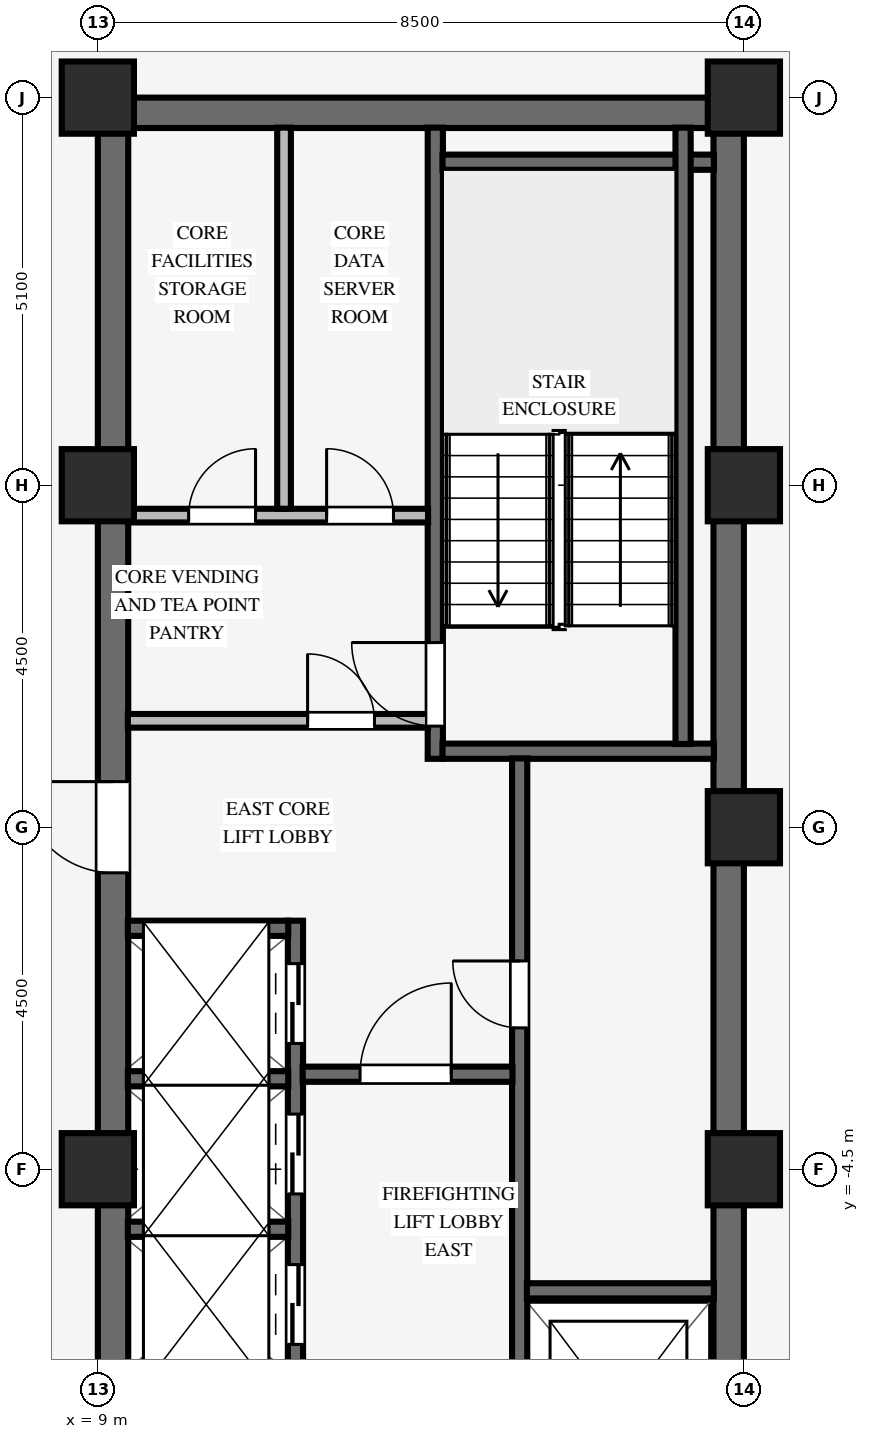
"""IFC4 building model, lengths in metres.
Left out: names, types, materials, properties, quantities, classifications, styles, units other than length and angle.
Written with IfcOpenShell. Run it as: python <this file> out.ifc"""

import sys

from ifc_helpers import new_model, si_unit, direction, frame, frame_2d, origin, origin_2d, place, context, subcontext, project, spatial, rectangle, extrude, source, transform, mapped, element, fill, save


model = new_model("IFC4")
c1 = context("Model", 3, precision=1e-05, world=origin(), true_north=direction((0.0, 1.0)))
c2 = subcontext(c1, "Body", "Model", "MODEL_VIEW")
j1 = project(units=[si_unit("LENGTHUNIT", "METRE"), si_unit("PLANEANGLEUNIT", "RADIAN")], contexts=[c1])
p1 = place(None, origin())
s1 = spatial("IfcSite", under=j1, at=p1, CompositionType="ELEMENT")
p2 = place(p1, origin())
s2 = spatial("IfcBuilding", under=s1, at=p2, CompositionType="ELEMENT")
p3 = place(p2, frame((0.0, 0.0, 153.05)))
s3 = spatial("IfcBuildingStorey", under=s2, at=p3, CompositionType="ELEMENT", Elevation=153.05)
p4 = place(p3, frame((9.0, 9.4, 0.0), z_axis=(0.0, 0.0, 1.0), x_axis=(1.0, 0.0, 0.0)))
e1 = element("IfcWall", 1, at=p4, inside=s3, PredefinedType="SHEAR", context=c2, shape_type="SweptSolid", body=[
    extrude(rectangle(XDim=8.5, YDim=0.4, at=frame_2d((4.25, 0.0))), origin(), (0.0, 0.0, 1.0), 3.37),
])
p5 = place(p3, frame((9.2, -9.205, 0.0), z_axis=(0.0, 0.0, 1.0), x_axis=(0.0, 1.0, 0.0)))
e2 = element("IfcWall", 2, at=p5, inside=s3, PredefinedType="SHEAR", context=c2, shape_type="SweptSolid", body=[
    extrude(rectangle(XDim=18.41, YDim=0.4, at=frame_2d((9.205, 0.0))), origin(), (0.0, 0.0, 1.0), 3.37),
])
p6 = place(p5, frame((8.605, 0.0, 0.0)))
e3 = element("IfcOpeningElement", 3, at=p6, cuts=e2, PredefinedType="OPENING", context=c2, shape_type="SweptSolid", body=[
    extrude(rectangle(XDim=1.2, YDim=2.15, at=frame_2d((0.6, 1.075))), frame((0.0, 0.21, 0.0), z_axis=(0.0, -1.0, 0.0), x_axis=(1.0, 0.0, 0.0)), (0.0, 0.0, 1.0), 0.42),
])
p7 = place(p3, frame((17.3, -9.205, 0.0), z_axis=(0.0, 0.0, 1.0), x_axis=(0.0, 1.0, 0.0)))
e4 = element("IfcWall", 4, at=p7, inside=s3, PredefinedType="SHEAR", context=c2, shape_type="SweptSolid", body=[
    extrude(rectangle(XDim=18.41, YDim=0.4, at=frame_2d((9.205, 0.0))), origin(), (0.0, 0.0, 1.0), 3.37),
])
for number, where, z_axis, x_axis in (
    (5, (9.0, -4.5, 0.0), (0.0, 0.0, 1.0), (1.0, 0.0, 0.0)),
    (6, (9.0, 4.5, 0.0), (0.0, 0.0, 1.0), (1.0, 0.0, 0.0)),
    (7, (9.0, 9.6, 0.0), (0.0, 0.0, 1.0), (1.0, 0.0, 0.0)),
    (8, (17.5, -4.5, 0.0), (0.0, 0.0, 1.0), (1.0, 0.0, 0.0)),
    (9, (17.5, 4.5, 0.0), (0.0, 0.0, 1.0), (1.0, 0.0, 0.0)),
    (10, (17.5, 9.6, 0.0), (0.0, 0.0, 1.0), (1.0, 0.0, 0.0)),
    (11, (17.5, 0.0, 0.0), (0.0, 0.0, 1.0), (1.0, 0.0, 0.0)),
):
    element("IfcColumn", number, at=place(p3, frame(where, z_axis=z_axis, x_axis=x_axis)), inside=s3, PredefinedType="COLUMN", context=c2, shape_type="SweptSolid", body=[
        extrude(rectangle(XDim=0.95, YDim=0.95, at=origin_2d()), origin(), (0.0, 0.0, 1.0), 3.37),
    ])
p8 = place(p3, frame((13.44, 0.9, 0.0), z_axis=(0.0, 0.0, 1.0), x_axis=(0.0, 1.0, 0.0)))
e12 = element("IfcWall", 12, at=p8, inside=s3, PredefinedType="SHEAR", context=c2, shape_type="SweptSolid", body=[
    extrude(rectangle(XDim=8.305, YDim=0.2, at=frame_2d((4.153, 0.0))), origin(), (0.0, 0.0, 1.0), 3.37),
])
p9 = place(p8, frame((0.43, 0.0, 0.0)))
e13 = element("IfcOpeningElement", 13, at=p9, cuts=e12, PredefinedType="OPENING", context=c2, shape_type="SweptSolid", body=[
    extrude(rectangle(XDim=1.1, YDim=2.15, at=frame_2d((0.55, 1.075))), frame((0.0, 0.11, 0.0), z_axis=(0.0, -1.0, 0.0), x_axis=(1.0, 0.0, 0.0)), (0.0, 0.0, 1.0), 0.22),
])
for number, where, z_axis, x_axis in (
    (14, (13.535, 1.0, 0.0), (0.0, 0.0, 1.0), (1.0, 0.0, 0.0)),
    (15, (13.535, 8.75, 0.0), (0.0, 0.0, 1.0), (1.0, 0.0, 0.0)),
):
    element("IfcWall", number, at=place(p3, frame(where, z_axis=z_axis, x_axis=x_axis)), inside=s3, PredefinedType="SHEAR", context=c2, shape_type="SweptSolid", body=[
        extrude(rectangle(XDim=3.57, YDim=0.2, at=frame_2d((1.785, 0.0))), origin(), (0.0, 0.0, 1.0), 3.37),
    ])
p10 = place(p3, frame((16.7, 1.095, 0.0), z_axis=(0.0, 0.0, 1.0), x_axis=(0.0, 1.0, 0.0)))
e16 = element("IfcWall", 16, at=p10, inside=s3, PredefinedType="SHEAR", context=c2, shape_type="SweptSolid", body=[
    extrude(rectangle(XDim=8.11, YDim=0.2, at=frame_2d((4.055, 0.0))), origin(), (0.0, 0.0, 1.0), 3.37),
])
p11 = place(p3, frame((14.55, -9.205, 0.0), z_axis=(0.0, 0.0, 1.0), x_axis=(0.0, 1.0, 0.0)))
e17 = element("IfcWall", 17, at=p11, inside=s3, PredefinedType="SHEAR", context=c2, shape_type="SweptSolid", body=[
    extrude(rectangle(XDim=10.11, YDim=0.2, at=frame_2d((5.055, 0.0))), origin(), (0.0, 0.0, 1.0), 3.37),
])
p12 = place(p11, frame((6.565, 0.0, 0.0)))
e18 = element("IfcOpeningElement", 18, at=p12, cuts=e17, PredefinedType="OPENING", context=c2, shape_type="SweptSolid", body=[
    extrude(rectangle(XDim=0.88, YDim=2.1, at=frame_2d((0.44, 1.05))), frame((0.0, 0.11, 0.0), z_axis=(0.0, -1.0, 0.0), x_axis=(1.0, 0.0, 0.0)), (0.0, 0.0, 1.0), 0.22),
])
p13 = place(p11, frame((0.93, 0.0, 0.0)))
e19 = element("IfcOpeningElement", 19, at=p13, cuts=e17, PredefinedType="OPENING", context=c2, shape_type="SweptSolid", body=[
    extrude(rectangle(XDim=1.15, YDim=2.15, at=frame_2d((0.575, 1.075))), frame((0.0, 0.11, 0.0), z_axis=(0.0, -1.0, 0.0), x_axis=(1.0, 0.0, 0.0)), (0.0, 0.0, 1.0), 0.22),
])
p14 = place(p3, frame((14.645, -6.1, 0.0), z_axis=(0.0, 0.0, 1.0), x_axis=(1.0, 0.0, 0.0)))
e20 = element("IfcWall", 20, at=p14, inside=s3, PredefinedType="SHEAR", context=c2, shape_type="SweptSolid", body=[
    extrude(rectangle(XDim=2.46, YDim=0.2, at=frame_2d((1.23, 0.0))), origin(), (0.0, 0.0, 1.0), 3.37),
])
p15 = place(p3, frame((11.6, -9.205, 0.0), z_axis=(0.0, 0.0, 1.0), x_axis=(0.0, 1.0, 0.0)))
e21 = element("IfcWall", 21, at=p15, inside=s3, PredefinedType="SHEAR", context=c2, shape_type="SweptSolid", body=[
    extrude(rectangle(XDim=7.975, YDim=0.2, at=frame_2d((3.988, 0.0))), origin(), (0.0, 0.0, 1.0), 3.37),
])
p16 = place(p15, frame((0.42, 0.0, 0.0)))
e22 = element("IfcOpeningElement", 22, at=p16, cuts=e21, PredefinedType="OPENING", context=c2, shape_type="SweptSolid", body=[
    extrude(rectangle(XDim=1.05, YDim=2.15, at=frame_2d((0.525, 1.075))), frame((0.0, 0.11, 0.0), z_axis=(0.0, -1.0, 0.0), x_axis=(1.0, 0.0, 0.0)), (0.0, 0.0, 1.0), 0.22),
])
p17 = place(p15, frame((2.4, 0.0, 0.0)))
e23 = element("IfcOpeningElement", 23, at=p17, cuts=e21, PredefinedType="OPENING", context=c2, shape_type="SweptSolid", body=[
    extrude(rectangle(XDim=1.05, YDim=2.15, at=frame_2d((0.525, 1.075))), frame((0.0, 0.11, 0.0), z_axis=(0.0, -1.0, 0.0), x_axis=(1.0, 0.0, 0.0)), (0.0, 0.0, 1.0), 0.22),
])
p18 = place(p15, frame((4.38, 0.0, 0.0)))
e24 = element("IfcOpeningElement", 24, at=p18, cuts=e21, PredefinedType="OPENING", context=c2, shape_type="SweptSolid", body=[
    extrude(rectangle(XDim=1.05, YDim=2.15, at=frame_2d((0.525, 1.075))), frame((0.0, 0.11, 0.0), z_axis=(0.0, -1.0, 0.0), x_axis=(1.0, 0.0, 0.0)), (0.0, 0.0, 1.0), 0.22),
])
p19 = place(p15, frame((6.36, 0.0, 0.0)))
e25 = element("IfcOpeningElement", 25, at=p19, cuts=e21, PredefinedType="OPENING", context=c2, shape_type="SweptSolid", body=[
    extrude(rectangle(XDim=1.05, YDim=2.15, at=frame_2d((0.525, 1.075))), frame((0.0, 0.11, 0.0), z_axis=(0.0, -1.0, 0.0), x_axis=(1.0, 0.0, 0.0)), (0.0, 0.0, 1.0), 0.22),
])
p20 = place(p3, frame((11.695, -3.25, 0.0), z_axis=(0.0, 0.0, 1.0), x_axis=(1.0, 0.0, 0.0)))
e26 = element("IfcWall", 26, at=p20, inside=s3, PredefinedType="SHEAR", context=c2, shape_type="SweptSolid", body=[
    extrude(rectangle(XDim=2.76, YDim=0.2, at=frame_2d((1.38, 0.0))), origin(), (0.0, 0.0, 1.0), 3.37),
])
p21 = place(p20, frame((0.755, 0.0, 0.0)))
e27 = element("IfcOpeningElement", 27, at=p21, cuts=e26, PredefinedType="OPENING", context=c2, shape_type="SweptSolid", body=[
    extrude(rectangle(XDim=1.2, YDim=2.15, at=frame_2d((0.6, 1.075))), frame((0.0, 0.11, 0.0), z_axis=(0.0, -1.0, 0.0), x_axis=(1.0, 0.0, 0.0)), (0.0, 0.0, 1.0), 0.22),
])
for number, where, z_axis, x_axis in (
    (28, (9.395, -5.29, 0.0), (0.0, 0.0, 1.0), (1.0, 0.0, 0.0)),
    (29, (9.395, -3.31, 0.0), (0.0, 0.0, 1.0), (1.0, 0.0, 0.0)),
    (30, (9.395, -1.33, 0.0), (0.0, 0.0, 1.0), (1.0, 0.0, 0.0)),
):
    element("IfcWall", number, at=place(p3, frame(where, z_axis=z_axis, x_axis=x_axis)), inside=s3, PredefinedType="SHEAR", context=c2, shape_type="SweptSolid", body=[
        extrude(rectangle(XDim=2.11, YDim=0.2, at=frame_2d((1.055, 0.0))), origin(), (0.0, 0.0, 1.0), 3.37),
    ])
p22 = place(p3, frame((9.395, 1.4, 0.0), z_axis=(0.0, 0.0, 1.0), x_axis=(1.0, 0.0, 0.0)))
e31 = element("IfcWall", 31, at=p22, inside=s3, PredefinedType="PARTITIONING", context=c2, shape_type="SweptSolid", body=[
    extrude(rectangle(XDim=3.95, YDim=0.18, at=frame_2d((1.975, 0.0))), origin(), (0.0, 0.0, 1.0), 3.36),
])
p23 = place(p22, frame((2.365, 0.0, 0.0)))
e32 = element("IfcOpeningElement", 32, at=p23, cuts=e31, PredefinedType="OPENING", context=c2, shape_type="SweptSolid", body=[
    extrude(rectangle(XDim=0.88, YDim=2.1, at=frame_2d((0.44, 1.05))), frame((0.0, 0.1, 0.0), z_axis=(0.0, -1.0, 0.0), x_axis=(1.0, 0.0, 0.0)), (0.0, 0.0, 1.0), 0.2),
])
p24 = place(p3, frame((9.395, 4.1, 0.0), z_axis=(0.0, 0.0, 1.0), x_axis=(1.0, 0.0, 0.0)))
e33 = element("IfcWall", 33, at=p24, inside=s3, PredefinedType="PARTITIONING", context=c2, shape_type="SweptSolid", body=[
    extrude(rectangle(XDim=3.95, YDim=0.18, at=frame_2d((1.975, 0.0))), origin(), (0.0, 0.0, 1.0), 3.36),
])
p25 = place(p24, frame((0.8, 0.0, 0.0)))
e34 = element("IfcOpeningElement", 34, at=p25, cuts=e33, PredefinedType="OPENING", context=c2, shape_type="SweptSolid", body=[
    extrude(rectangle(XDim=0.88, YDim=2.1, at=frame_2d((0.44, 1.05))), frame((0.0, 0.1, 0.0), z_axis=(0.0, -1.0, 0.0), x_axis=(1.0, 0.0, 0.0)), (0.0, 0.0, 1.0), 0.2),
])
p26 = place(p24, frame((2.615, 0.0, 0.0)))
e35 = element("IfcOpeningElement", 35, at=p26, cuts=e33, PredefinedType="OPENING", context=c2, shape_type="SweptSolid", body=[
    extrude(rectangle(XDim=0.88, YDim=2.1, at=frame_2d((0.44, 1.05))), frame((0.0, 0.1, 0.0), z_axis=(0.0, -1.0, 0.0), x_axis=(1.0, 0.0, 0.0)), (0.0, 0.0, 1.0), 0.2),
])
p27 = place(p3, frame((11.45, 4.19, 0.0), z_axis=(0.0, 0.0, 1.0), x_axis=(0.0, 1.0, 0.0)))
e36 = element("IfcWall", 36, at=p27, inside=s3, PredefinedType="PARTITIONING", context=c2, shape_type="SweptSolid", body=[
    extrude(rectangle(XDim=5.015, YDim=0.18, at=frame_2d((2.508, 0.0))), origin(), (0.0, 0.0, 1.0), 3.36),
])
m1 = source(origin(), c2, "Body", "SweptSolid", [
    extrude(rectangle(XDim=1.1, YDim=2.15, at=frame_2d((0.55, 1.075))), frame((0.0, 0.025, 0.0), z_axis=(0.0, -1.0, 0.0), x_axis=(1.0, 0.0, 0.0)), (0.0, 0.0, 1.0), 0.05),
])
p28 = place(p9, origin())
e37 = element("IfcDoor", 37, at=p28, inside=s3, OperationType="SINGLE_SWING_RIGHT", PredefinedType="DOOR", context=c2, shape_type="MappedRepresentation", body=[
    mapped(m1, transform((0.0, 0.0, 0.0), scale=1.0)),
])
fill(e13, e37)
m2 = source(origin(), c2, "Body", "SweptSolid", [
    extrude(rectangle(XDim=0.88, YDim=2.1, at=frame_2d((0.44, 1.05))), frame((0.0, 0.025, 0.0), z_axis=(0.0, -1.0, 0.0), x_axis=(1.0, 0.0, 0.0)), (0.0, 0.0, 1.0), 0.05),
])
p29 = place(p12, origin())
e38 = element("IfcDoor", 38, at=p29, inside=s3, OperationType="SINGLE_SWING_RIGHT", PredefinedType="DOOR", context=c2, shape_type="MappedRepresentation", body=[
    mapped(m2, transform((0.0, 0.0, 0.0), scale=1.0)),
])
fill(e18, e38)
m3 = source(origin(), c2, "Body", "SweptSolid", [
    extrude(rectangle(XDim=1.2, YDim=2.15, at=frame_2d((0.6, 1.075))), frame((0.0, 0.025, 0.0), z_axis=(0.0, -1.0, 0.0), x_axis=(1.0, 0.0, 0.0)), (0.0, 0.0, 1.0), 0.05),
])
p30 = place(p21, origin())
e39 = element("IfcDoor", 39, at=p30, inside=s3, OperationType="SINGLE_SWING_RIGHT", PredefinedType="DOOR", context=c2, shape_type="MappedRepresentation", body=[
    mapped(m3, transform((0.0, 0.0, 0.0), scale=1.0)),
])
fill(e27, e39)
p31 = place(p6, origin())
e40 = element("IfcDoor", 40, at=p31, inside=s3, OperationType="SINGLE_SWING_RIGHT", PredefinedType="DOOR", context=c2, shape_type="MappedRepresentation", body=[
    mapped(m3, transform((0.0, 0.0, 0.0), scale=1.0)),
])
fill(e3, e40)
p32 = place(p23, origin())
e41 = element("IfcDoor", 41, at=p32, inside=s3, OperationType="SINGLE_SWING_LEFT", PredefinedType="DOOR", context=c2, shape_type="MappedRepresentation", body=[
    mapped(m2, transform((0.0, 0.0, 0.0), scale=1.0)),
])
fill(e32, e41)
p33 = place(p25, origin())
e42 = element("IfcDoor", 42, at=p33, inside=s3, OperationType="SINGLE_SWING_RIGHT", PredefinedType="DOOR", context=c2, shape_type="MappedRepresentation", body=[
    mapped(m2, transform((0.0, 0.0, 0.0), scale=1.0)),
])
fill(e34, e42)
p34 = place(p26, origin())
e43 = element("IfcDoor", 43, at=p34, inside=s3, OperationType="SINGLE_SWING_LEFT", PredefinedType="DOOR", context=c2, shape_type="MappedRepresentation", body=[
    mapped(m2, transform((0.0, 0.0, 0.0), scale=1.0)),
])
fill(e35, e43)
m4 = source(origin(), c2, "Body", "SweptSolid", [
    extrude(rectangle(XDim=1.05, YDim=2.15, at=frame_2d((0.525, 1.075))), frame((0.0, 0.025, 0.0), z_axis=(0.0, -1.0, 0.0), x_axis=(1.0, 0.0, 0.0)), (0.0, 0.0, 1.0), 0.05),
])
p35 = place(p17, origin())
e44 = element("IfcDoor", 44, at=p35, inside=s3, OperationType="DOUBLE_DOOR_SLIDING", PredefinedType="DOOR", context=c2, shape_type="MappedRepresentation", body=[
    mapped(m4, transform((0.0, 0.0, 0.0), scale=1.0)),
])
fill(e23, e44)
p36 = place(p18, origin())
e45 = element("IfcDoor", 45, at=p36, inside=s3, OperationType="DOUBLE_DOOR_SLIDING", PredefinedType="DOOR", context=c2, shape_type="MappedRepresentation", body=[
    mapped(m4, transform((0.0, 0.0, 0.0), scale=1.0)),
])
fill(e24, e45)
p37 = place(p19, origin())
e46 = element("IfcDoor", 46, at=p37, inside=s3, OperationType="DOUBLE_DOOR_SLIDING", PredefinedType="DOOR", context=c2, shape_type="MappedRepresentation", body=[
    mapped(m4, transform((0.0, 0.0, 0.0), scale=1.0)),
])
fill(e25, e46)
save(model, sys.argv[1])
